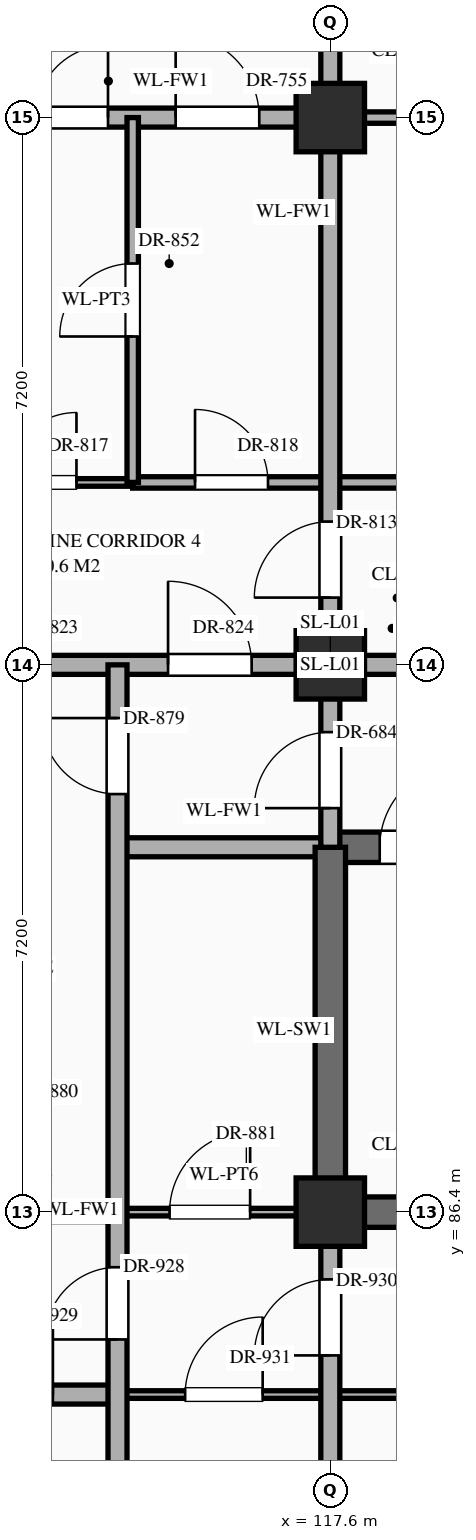
"""IFC4 building model, lengths in metres.
Left out: names, types, materials, properties, quantities, classifications, styles, units other than length and angle.
Written with IfcOpenShell. Run it as: python <this file> out.ifc"""

import sys

from ifc_helpers import new_model, si_unit, direction, frame, frame_2d, origin, origin_2d, place, context, subcontext, project, spatial, rectangle, extrude, element, fill, save


model = new_model("IFC4")
c1 = context("Model", 3, precision=1e-05, world=origin(), true_north=direction((0.0, 1.0)))
c2 = subcontext(c1, "Body", "Model", "MODEL_VIEW")
j1 = project(units=[si_unit("LENGTHUNIT", "METRE"), si_unit("PLANEANGLEUNIT", "RADIAN")], contexts=[c1])
p1 = place(None, origin())
s1 = spatial("IfcSite", under=j1, at=p1, CompositionType="ELEMENT")
p2 = place(p1, origin())
s2 = spatial("IfcBuilding", under=s1, at=p2, CompositionType="ELEMENT")
p3 = place(p2, origin())
s3 = spatial("IfcBuildingStorey", under=s2, at=p3, CompositionType="ELEMENT", Elevation=0.0)
for number, where, z_axis, x_axis in (
    (1, (117.6, 86.4, 0.0), (0.0, 0.0, 1.0), (1.0, 0.0, 0.0)),
    (2, (117.6, 93.6, 0.0), (0.0, 0.0, 1.0), (1.0, 0.0, 0.0)),
    (3, (117.6, 100.8, 0.0), (0.0, 0.0, 1.0), (1.0, 0.0, 0.0)),
):
    element("IfcColumn", number, at=place(p3, frame(where, z_axis=z_axis, x_axis=x_axis)), inside=s3, PredefinedType="COLUMN", context=c2, shape_type="SweptSolid", body=[
        extrude(rectangle(XDim=0.9, YDim=0.9, at=origin_2d()), origin(), (0.0, 0.0, 1.0), 5.4),
    ])
p4 = place(p3, frame((112.0, 84.0, 0.0), z_axis=(0.0, 0.0, 1.0), x_axis=(1.0, 0.0, 0.0)))
e4 = element("IfcWall", 4, at=p4, inside=s3, PredefinedType="STANDARD", context=c2, shape_type="SweptSolid", body=[
    extrude(rectangle(XDim=2.8, YDim=0.25, at=frame_2d((1.4, 0.0))), origin(), (0.0, 0.0, 1.0), 5.12),
])
p5 = place(p4, frame((0.85, 0.0, 0.0)))
e5 = element("IfcOpeningElement", 5, at=p5, cuts=e4, PredefinedType="OPENING", context=c2, shape_type="SweptSolid", body=[
    extrude(rectangle(XDim=1.1, YDim=2.2, at=frame_2d((0.55, 1.1))), frame((0.0, 0.137, 0.0), z_axis=(0.0, -1.0, 0.0), x_axis=(1.0, 0.0, 0.0)), (0.0, 0.0, 1.0), 0.274),
])
p6 = place(p3, frame((114.8, 84.0, 0.0), z_axis=(0.0, 0.0, 1.0), x_axis=(1.0, 0.0, 0.0)))
e6 = element("IfcWall", 6, at=p6, inside=s3, PredefinedType="STANDARD", context=c2, shape_type="SweptSolid", body=[
    extrude(rectangle(XDim=22.4, YDim=0.1, at=frame_2d((11.2, 0.0))), origin(), (0.0, 0.0, 1.0), 5.12),
])
p7 = place(p6, frame((0.89, 0.0, 0.0)))
e7 = element("IfcOpeningElement", 7, at=p7, cuts=e6, PredefinedType="OPENING", context=c2, shape_type="SweptSolid", body=[
    extrude(rectangle(XDim=1.02, YDim=2.4, at=frame_2d((0.51, 1.2))), frame((0.0, 0.062, 0.0), z_axis=(0.0, -1.0, 0.0), x_axis=(1.0, 0.0, 0.0)), (0.0, 0.0, 1.0), 0.124),
])
p8 = place(p6, frame((10.63, 0.0, 0.0)))
e8 = element("IfcOpeningElement", 8, at=p8, cuts=e6, PredefinedType="OPENING", context=c2, shape_type="SweptSolid", body=[
    extrude(rectangle(XDim=1.14, YDim=2.4, at=frame_2d((0.57, 1.2))), frame((0.0, 0.062, 0.0), z_axis=(0.0, -1.0, 0.0), x_axis=(1.0, 0.0, 0.0)), (0.0, 0.0, 1.0), 0.124),
])
p9 = place(p6, frame((20.55, 0.0, 0.0)))
e9 = element("IfcOpeningElement", 9, at=p9, cuts=e6, PredefinedType="OPENING", context=c2, shape_type="SweptSolid", body=[
    extrude(rectangle(XDim=0.9, YDim=2.15, at=frame_2d((0.45, 1.075))), frame((0.0, 0.062, 0.0), z_axis=(0.0, -1.0, 0.0), x_axis=(1.0, 0.0, 0.0)), (0.0, 0.0, 1.0), 0.124),
])
p10 = place(p3, frame((112.0, 86.4, 0.0), z_axis=(0.0, 0.0, 1.0), x_axis=(1.0, 0.0, 0.0)))
e10 = element("IfcWall", 10, at=p10, inside=s3, PredefinedType="STANDARD", context=c2, shape_type="SweptSolid", body=[
    extrude(rectangle(XDim=2.8, YDim=0.25, at=frame_2d((1.4, 0.0))), origin(), (0.0, 0.0, 1.0), 4.27),
])
p11 = place(p10, frame((0.925, 0.0, 0.0)))
e11 = element("IfcOpeningElement", 11, at=p11, cuts=e10, PredefinedType="OPENING", context=c2, shape_type="SweptSolid", body=[
    extrude(rectangle(XDim=0.95, YDim=2.15, at=frame_2d((0.475, 1.075))), frame((0.0, 0.137, 0.0), z_axis=(0.0, -1.0, 0.0), x_axis=(1.0, 0.0, 0.0)), (0.0, 0.0, 1.0), 0.274),
])
p12 = place(p3, frame((114.8, 86.4, 0.0), z_axis=(0.0, 0.0, 1.0), x_axis=(1.0, 0.0, 0.0)))
e12 = element("IfcWall", 12, at=p12, inside=s3, PredefinedType="STANDARD", context=c2, shape_type="SweptSolid", body=[
    extrude(rectangle(XDim=2.8, YDim=0.1, at=frame_2d((1.4, 0.0))), origin(), (0.0, 0.0, 1.0), 4.27),
])
p13 = place(p12, frame((0.685, 0.0, 0.0)))
e13 = element("IfcOpeningElement", 13, at=p13, cuts=e12, PredefinedType="OPENING", context=c2, shape_type="SweptSolid", body=[
    extrude(rectangle(XDim=1.06, YDim=2.4, at=frame_2d((0.53, 1.2))), frame((0.0, 0.062, 0.0), z_axis=(0.0, -1.0, 0.0), x_axis=(1.0, 0.0, 0.0)), (0.0, 0.0, 1.0), 0.124),
])
p14 = place(p3, frame((117.6, 86.4, 0.0), z_axis=(0.0, 0.0, 1.0), x_axis=(1.0, 0.0, 0.0)))
e14 = element("IfcWall", 14, at=p14, inside=s3, PredefinedType="SHEAR", context=c2, shape_type="SweptSolid", body=[
    extrude(rectangle(XDim=8.4, YDim=0.4, at=frame_2d((4.2, 0.0))), origin(), (0.0, 0.0, 1.0), 5.12),
])
p15 = place(p3, frame((114.8, 91.2, 0.0), z_axis=(0.0, 0.0, 1.0), x_axis=(1.0, 0.0, 0.0)))
e15 = element("IfcWall", 15, at=p15, inside=s3, PredefinedType="STANDARD", context=c2, shape_type="SweptSolid", body=[
    extrude(rectangle(XDim=2.8, YDim=0.25, at=frame_2d((1.4, 0.0))), origin(), (0.0, 0.0, 1.0), 5.12),
])
p16 = place(p3, frame((117.6, 91.2, 0.0), z_axis=(0.0, 0.0, 1.0), x_axis=(1.0, 0.0, 0.0)))
e16 = element("IfcWall", 16, at=p16, inside=s3, PredefinedType="SHEAR", context=c2, shape_type="SweptSolid", body=[
    extrude(rectangle(XDim=8.4, YDim=0.4, at=frame_2d((4.2, 0.0))), origin(), (0.0, 0.0, 1.0), 5.12),
])
p17 = place(p16, frame((0.65, 0.0, 0.0)))
e17 = element("IfcOpeningElement", 17, at=p17, cuts=e16, PredefinedType="OPENING", context=c2, shape_type="SweptSolid", body=[
    extrude(rectangle(XDim=1.1, YDim=2.2, at=frame_2d((0.55, 1.1))), frame((0.0, 0.212, 0.0), z_axis=(0.0, -1.0, 0.0), x_axis=(1.0, 0.0, 0.0)), (0.0, 0.0, 1.0), 0.424),
])
p18 = place(p3, frame((100.8, 93.6, 0.0), z_axis=(0.0, 0.0, 1.0), x_axis=(1.0, 0.0, 0.0)))
e18 = element("IfcWall", 18, at=p18, inside=s3, PredefinedType="STANDARD", context=c2, shape_type="SweptSolid", body=[
    extrude(rectangle(XDim=25.2, YDim=0.25, at=frame_2d((12.6, 0.0))), origin(), (0.0, 0.0, 1.0), 4.27),
])
p19 = place(p18, frame((3.2, 0.0, 0.0)))
e19 = element("IfcOpeningElement", 19, at=p19, cuts=e18, PredefinedType="OPENING", context=c2, shape_type="SweptSolid", body=[
    extrude(rectangle(XDim=2.0, YDim=2.4, at=frame_2d((1.0, 1.2))), frame((0.0, 0.137, 0.0), z_axis=(0.0, -1.0, 0.0), x_axis=(1.0, 0.0, 0.0)), (0.0, 0.0, 1.0), 0.274),
])
p20 = place(p18, frame((20.212, 0.0, 0.0)))
e20 = element("IfcOpeningElement", 20, at=p20, cuts=e18, PredefinedType="OPENING", context=c2, shape_type="SweptSolid", body=[
    extrude(rectangle(XDim=1.6, YDim=2.3, at=frame_2d((0.8, 1.15))), frame((0.0, 0.137, 0.0), z_axis=(0.0, -1.0, 0.0), x_axis=(1.0, 0.0, 0.0)), (0.0, 0.0, 1.0), 0.274),
])
p21 = place(p18, frame((9.485, 0.0, 0.0)))
e21 = element("IfcOpeningElement", 21, at=p21, cuts=e18, PredefinedType="OPENING", context=c2, shape_type="SweptSolid", body=[
    extrude(rectangle(XDim=1.0, YDim=2.2, at=frame_2d((0.5, 1.1))), frame((0.0, 0.137, 0.0), z_axis=(0.0, -1.0, 0.0), x_axis=(1.0, 0.0, 0.0)), (0.0, 0.0, 1.0), 0.274),
])
p22 = place(p18, frame((12.125, 0.0, 0.0)))
e22 = element("IfcOpeningElement", 22, at=p22, cuts=e18, PredefinedType="OPENING", context=c2, shape_type="SweptSolid", body=[
    extrude(rectangle(XDim=0.95, YDim=2.15, at=frame_2d((0.475, 1.075))), frame((0.0, 0.137, 0.0), z_axis=(0.0, -1.0, 0.0), x_axis=(1.0, 0.0, 0.0)), (0.0, 0.0, 1.0), 0.274),
])
p23 = place(p18, frame((14.665, 0.0, 0.0)))
e23 = element("IfcOpeningElement", 23, at=p23, cuts=e18, PredefinedType="OPENING", context=c2, shape_type="SweptSolid", body=[
    extrude(rectangle(XDim=1.1, YDim=2.2, at=frame_2d((0.55, 1.1))), frame((0.0, 0.137, 0.0), z_axis=(0.0, -1.0, 0.0), x_axis=(1.0, 0.0, 0.0)), (0.0, 0.0, 1.0), 0.274),
])
p24 = place(p3, frame((109.2, 96.0, 0.0), z_axis=(0.0, 0.0, 1.0), x_axis=(1.0, 0.0, 0.0)))
e24 = element("IfcWall", 24, at=p24, inside=s3, PredefinedType="STANDARD", context=c2, shape_type="SweptSolid", body=[
    extrude(rectangle(XDim=5.8, YDim=0.1, at=frame_2d((2.9, 0.0))), origin(), (0.0, 0.0, 1.0), 5.12),
])
p25 = place(p24, frame((1.27, 0.0, 0.0)))
e25 = element("IfcOpeningElement", 25, at=p25, cuts=e24, PredefinedType="OPENING", context=c2, shape_type="SweptSolid", body=[
    extrude(rectangle(XDim=0.86, YDim=2.1, at=frame_2d((0.43, 1.05))), frame((0.0, 0.062, 0.0), z_axis=(0.0, -1.0, 0.0), x_axis=(1.0, 0.0, 0.0)), (0.0, 0.0, 1.0), 0.124),
])
p26 = place(p24, frame((4.14, 0.0, 0.0)))
e26 = element("IfcOpeningElement", 26, at=p26, cuts=e24, PredefinedType="OPENING", context=c2, shape_type="SweptSolid", body=[
    extrude(rectangle(XDim=0.92, YDim=2.15, at=frame_2d((0.46, 1.075))), frame((0.0, 0.062, 0.0), z_axis=(0.0, -1.0, 0.0), x_axis=(1.0, 0.0, 0.0)), (0.0, 0.0, 1.0), 0.124),
])
p27 = place(p3, frame((115.0, 96.0, 0.0), z_axis=(0.0, 0.0, 1.0), x_axis=(1.0, 0.0, 0.0)))
e27 = element("IfcWall", 27, at=p27, inside=s3, PredefinedType="STANDARD", context=c2, shape_type="SweptSolid", body=[
    extrude(rectangle(XDim=19.4, YDim=0.15, at=frame_2d((9.7, 0.0))), origin(), (0.0, 0.0, 1.0), 5.12),
])
p28 = place(p27, frame((0.82, 0.0, 0.0)))
e28 = element("IfcOpeningElement", 28, at=p28, cuts=e27, PredefinedType="OPENING", context=c2, shape_type="SweptSolid", body=[
    extrude(rectangle(XDim=0.96, YDim=2.2, at=frame_2d((0.48, 1.1))), frame((0.0, 0.087, 0.0), z_axis=(0.0, -1.0, 0.0), x_axis=(1.0, 0.0, 0.0)), (0.0, 0.0, 1.0), 0.174),
])
p29 = place(p27, frame((6.18, 0.0, 0.0)))
e29 = element("IfcOpeningElement", 29, at=p29, cuts=e27, PredefinedType="OPENING", context=c2, shape_type="SweptSolid", body=[
    extrude(rectangle(XDim=1.24, YDim=2.3, at=frame_2d((0.62, 1.15))), frame((0.0, 0.087, 0.0), z_axis=(0.0, -1.0, 0.0), x_axis=(1.0, 0.0, 0.0)), (0.0, 0.0, 1.0), 0.174),
])
p30 = place(p27, frame((14.56, 0.0, 0.0)))
e30 = element("IfcOpeningElement", 30, at=p30, cuts=e27, PredefinedType="OPENING", context=c2, shape_type="SweptSolid", body=[
    extrude(rectangle(XDim=1.28, YDim=2.35, at=frame_2d((0.64, 1.175))), frame((0.0, 0.087, 0.0), z_axis=(0.0, -1.0, 0.0), x_axis=(1.0, 0.0, 0.0)), (0.0, 0.0, 1.0), 0.174),
])
p31 = place(p3, frame((113.4, 100.8, 0.0), z_axis=(0.0, 0.0, 1.0), x_axis=(1.0, 0.0, 0.0)))
e31 = element("IfcWall", 31, at=p31, inside=s3, PredefinedType="STANDARD", context=c2, shape_type="SweptSolid", body=[
    extrude(rectangle(XDim=4.2, YDim=0.25, at=frame_2d((2.1, 0.0))), origin(), (0.0, 0.0, 1.0), 4.27),
])
p32 = place(p31, frame((0.325, 0.0, 0.0)))
e32 = element("IfcOpeningElement", 32, at=p32, cuts=e31, PredefinedType="OPENING", context=c2, shape_type="SweptSolid", body=[
    extrude(rectangle(XDim=0.95, YDim=2.15, at=frame_2d((0.475, 1.075))), frame((0.0, 0.137, 0.0), z_axis=(0.0, -1.0, 0.0), x_axis=(1.0, 0.0, 0.0)), (0.0, 0.0, 1.0), 0.274),
])
p33 = place(p31, frame((2.165, 0.0, 0.0)))
e33 = element("IfcOpeningElement", 33, at=p33, cuts=e31, PredefinedType="OPENING", context=c2, shape_type="SweptSolid", body=[
    extrude(rectangle(XDim=1.1, YDim=2.2, at=frame_2d((0.55, 1.1))), frame((0.0, 0.137, 0.0), z_axis=(0.0, -1.0, 0.0), x_axis=(1.0, 0.0, 0.0)), (0.0, 0.0, 1.0), 0.274),
])
p34 = place(p3, frame((117.6, 100.8, 0.0), z_axis=(0.0, 0.0, 1.0), x_axis=(1.0, 0.0, 0.0)))
e34 = element("IfcWall", 34, at=p34, inside=s3, PredefinedType="STANDARD", context=c2, shape_type="SweptSolid", body=[
    extrude(rectangle(XDim=4.2, YDim=0.15, at=frame_2d((2.1, 0.0))), origin(), (0.0, 0.0, 1.0), 4.27),
])
p35 = place(p34, frame((1.855, 0.0, 0.0)))
e35 = element("IfcOpeningElement", 35, at=p35, cuts=e34, PredefinedType="OPENING", context=c2, shape_type="SweptSolid", body=[
    extrude(rectangle(XDim=0.86, YDim=2.1, at=frame_2d((0.43, 1.05))), frame((0.0, 0.087, 0.0), z_axis=(0.0, -1.0, 0.0), x_axis=(1.0, 0.0, 0.0)), (0.0, 0.0, 1.0), 0.174),
])
p36 = place(p3, frame((114.8, 79.24, 0.0), z_axis=(0.0, 0.0, 1.0), x_axis=(0.0, 1.0, 0.0)))
e36 = element("IfcWall", 36, at=p36, inside=s3, PredefinedType="STANDARD", context=c2, shape_type="SweptSolid", body=[
    extrude(rectangle(XDim=14.36, YDim=0.25, at=frame_2d((7.18, 0.0))), origin(), (0.0, 0.0, 1.0), 5.12),
])
p37 = place(p36, frame((12.66, 0.0, 0.0)))
e37 = element("IfcOpeningElement", 37, at=p37, cuts=e36, PredefinedType="OPENING", context=c2, shape_type="SweptSolid", body=[
    extrude(rectangle(XDim=1.0, YDim=2.2, at=frame_2d((0.5, 1.1))), frame((0.0, 0.137, 0.0), z_axis=(0.0, -1.0, 0.0), x_axis=(1.0, 0.0, 0.0)), (0.0, 0.0, 1.0), 0.274),
])
p38 = place(p36, frame((5.485, 0.0, 0.0)))
e38 = element("IfcOpeningElement", 38, at=p38, cuts=e36, PredefinedType="OPENING", context=c2, shape_type="SweptSolid", body=[
    extrude(rectangle(XDim=0.95, YDim=2.15, at=frame_2d((0.475, 1.075))), frame((0.0, 0.137, 0.0), z_axis=(0.0, -1.0, 0.0), x_axis=(1.0, 0.0, 0.0)), (0.0, 0.0, 1.0), 0.274),
])
p39 = place(p3, frame((115.0, 96.0, 0.0), z_axis=(0.0, 0.0, 1.0), x_axis=(0.0, 1.0, 0.0)))
e39 = element("IfcWall", 39, at=p39, inside=s3, PredefinedType="STANDARD", context=c2, shape_type="SweptSolid", body=[
    extrude(rectangle(XDim=4.8, YDim=0.15, at=frame_2d((2.4, 0.0))), origin(), (0.0, 0.0, 1.0), 5.12),
])
p40 = place(p39, frame((1.92, 0.0, 0.0)))
e40 = element("IfcOpeningElement", 40, at=p40, cuts=e39, PredefinedType="OPENING", context=c2, shape_type="SweptSolid", body=[
    extrude(rectangle(XDim=0.96, YDim=2.2, at=frame_2d((0.48, 1.1))), frame((0.0, 0.087, 0.0), z_axis=(0.0, -1.0, 0.0), x_axis=(1.0, 0.0, 0.0)), (0.0, 0.0, 1.0), 0.174),
])
p41 = place(p3, frame((117.6, 79.24, 0.0), z_axis=(0.0, 0.0, 1.0), x_axis=(0.0, 1.0, 0.0)))
e41 = element("IfcWall", 41, at=p41, inside=s3, PredefinedType="STANDARD", context=c2, shape_type="SweptSolid", body=[
    extrude(rectangle(XDim=7.16, YDim=0.25, at=frame_2d((3.58, 0.0))), origin(), (0.0, 0.0, 1.0), 4.37),
])
p42 = place(p41, frame((5.275, 0.0, 0.0)))
e42 = element("IfcOpeningElement", 42, at=p42, cuts=e41, PredefinedType="OPENING", context=c2, shape_type="SweptSolid", body=[
    extrude(rectangle(XDim=1.0, YDim=2.2, at=frame_2d((0.5, 1.1))), frame((0.0, 0.137, 0.0), z_axis=(0.0, -1.0, 0.0), x_axis=(1.0, 0.0, 0.0)), (0.0, 0.0, 1.0), 0.274),
])
p43 = place(p3, frame((117.6, 86.4, 0.0), z_axis=(0.0, 0.0, 1.0), x_axis=(0.0, 1.0, 0.0)))
e43 = element("IfcWall", 43, at=p43, inside=s3, PredefinedType="SHEAR", context=c2, shape_type="SweptSolid", body=[
    extrude(rectangle(XDim=4.8, YDim=0.4, at=frame_2d((2.4, 0.0))), origin(), (0.0, 0.0, 1.0), 5.12),
])
p44 = place(p3, frame((117.6, 91.2, 0.0), z_axis=(0.0, 0.0, 1.0), x_axis=(0.0, 1.0, 0.0)))
e44 = element("IfcWall", 44, at=p44, inside=s3, PredefinedType="STANDARD", context=c2, shape_type="SweptSolid", body=[
    extrude(rectangle(XDim=13.2, YDim=0.25, at=frame_2d((6.6, 0.0))), origin(), (0.0, 0.0, 1.0), 4.37),
])
p45 = place(p44, frame((0.515, 0.0, 0.0)))
e45 = element("IfcOpeningElement", 45, at=p45, cuts=e44, PredefinedType="OPENING", context=c2, shape_type="SweptSolid", body=[
    extrude(rectangle(XDim=1.0, YDim=2.2, at=frame_2d((0.5, 1.1))), frame((0.0, 0.137, 0.0), z_axis=(0.0, -1.0, 0.0), x_axis=(1.0, 0.0, 0.0)), (0.0, 0.0, 1.0), 0.274),
])
p46 = place(p44, frame((10.51, 0.0, 0.0)))
e46 = element("IfcOpeningElement", 46, at=p46, cuts=e44, PredefinedType="OPENING", context=c2, shape_type="SweptSolid", body=[
    extrude(rectangle(XDim=0.95, YDim=2.15, at=frame_2d((0.475, 1.075))), frame((0.0, 0.137, 0.0), z_axis=(0.0, -1.0, 0.0), x_axis=(1.0, 0.0, 0.0)), (0.0, 0.0, 1.0), 0.274),
])
p47 = place(p44, frame((3.285, 0.0, 0.0)))
e47 = element("IfcOpeningElement", 47, at=p47, cuts=e44, PredefinedType="OPENING", context=c2, shape_type="SweptSolid", body=[
    extrude(rectangle(XDim=1.0, YDim=2.2, at=frame_2d((0.5, 1.1))), frame((0.0, 0.137, 0.0), z_axis=(0.0, -1.0, 0.0), x_axis=(1.0, 0.0, 0.0)), (0.0, 0.0, 1.0), 0.274),
])
p48 = place(p17, origin())
e48 = element("IfcDoor", 48, at=p48, inside=s3, OperationType="SINGLE_SWING_RIGHT", PredefinedType="DOOR", context=c2, shape_type="SweptSolid", body=[
    extrude(rectangle(XDim=1.1, YDim=2.2, at=frame_2d((0.55, 1.1))), frame((0.0, 0.025, 0.0), z_axis=(0.0, -1.0, 0.0), x_axis=(1.0, 0.0, 0.0)), (0.0, 0.0, 1.0), 0.05),
])
fill(e17, e48)
p49 = place(p45, origin())
e49 = element("IfcDoor", 49, at=p49, inside=s3, OperationType="SINGLE_SWING_LEFT", PredefinedType="DOOR", context=c2, shape_type="SweptSolid", body=[
    extrude(rectangle(XDim=1.0, YDim=2.2, at=frame_2d((0.5, 1.1))), frame((0.0, 0.025, 0.0), z_axis=(0.0, -1.0, 0.0), x_axis=(1.0, 0.0, 0.0)), (0.0, 0.0, 1.0), 0.05),
])
fill(e45, e49)
p50 = place(p32, origin())
e50 = element("IfcDoor", 50, at=p50, inside=s3, OperationType="SINGLE_SWING_RIGHT", PredefinedType="DOOR", context=c2, shape_type="SweptSolid", body=[
    extrude(rectangle(XDim=0.95, YDim=2.15, at=frame_2d((0.475, 1.075))), frame((0.0, 0.025, 0.0), z_axis=(0.0, -1.0, 0.0), x_axis=(1.0, 0.0, 0.0)), (0.0, 0.0, 1.0), 0.05),
])
fill(e32, e50)
p51 = place(p33, origin())
e51 = element("IfcDoor", 51, at=p51, inside=s3, OperationType="SINGLE_SWING_LEFT", PredefinedType="DOOR", context=c2, shape_type="SweptSolid", body=[
    extrude(rectangle(XDim=1.1, YDim=2.2, at=frame_2d((0.55, 1.1))), frame((0.0, 0.025, 0.0), z_axis=(0.0, -1.0, 0.0), x_axis=(1.0, 0.0, 0.0)), (0.0, 0.0, 1.0), 0.05),
])
fill(e33, e51)
p52 = place(p47, origin())
e52 = element("IfcDoor", 52, at=p52, inside=s3, OperationType="SINGLE_SWING_LEFT", PredefinedType="DOOR", context=c2, shape_type="SweptSolid", body=[
    extrude(rectangle(XDim=1.0, YDim=2.2, at=frame_2d((0.5, 1.1))), frame((0.0, 0.025, 0.0), z_axis=(0.0, -1.0, 0.0), x_axis=(1.0, 0.0, 0.0)), (0.0, 0.0, 1.0), 0.05),
])
fill(e47, e52)
p53 = place(p26, origin())
e53 = element("IfcDoor", 53, at=p53, inside=s3, OperationType="SINGLE_SWING_RIGHT", PredefinedType="DOOR", context=c2, shape_type="SweptSolid", body=[
    extrude(rectangle(XDim=0.92, YDim=2.15, at=frame_2d((0.46, 1.075))), frame((0.0, 0.025, 0.0), z_axis=(0.0, -1.0, 0.0), x_axis=(1.0, 0.0, 0.0)), (0.0, 0.0, 1.0), 0.05),
])
fill(e26, e53)
p54 = place(p28, origin())
e54 = element("IfcDoor", 54, at=p54, inside=s3, OperationType="SINGLE_SWING_LEFT", PredefinedType="DOOR", context=c2, shape_type="SweptSolid", body=[
    extrude(rectangle(XDim=0.96, YDim=2.2, at=frame_2d((0.48, 1.1))), frame((0.0, 0.025, 0.0), z_axis=(0.0, -1.0, 0.0), x_axis=(1.0, 0.0, 0.0)), (0.0, 0.0, 1.0), 0.05),
])
fill(e28, e54)
p55 = place(p23, origin())
e55 = element("IfcDoor", 55, at=p55, inside=s3, OperationType="SINGLE_SWING_LEFT", PredefinedType="DOOR", context=c2, shape_type="SweptSolid", body=[
    extrude(rectangle(XDim=1.1, YDim=2.2, at=frame_2d((0.55, 1.1))), frame((0.0, 0.025, 0.0), z_axis=(0.0, -1.0, 0.0), x_axis=(1.0, 0.0, 0.0)), (0.0, 0.0, 1.0), 0.05),
])
fill(e23, e55)
p56 = place(p40, origin())
e56 = element("IfcDoor", 56, at=p56, inside=s3, OperationType="SINGLE_SWING_LEFT", PredefinedType="DOOR", context=c2, shape_type="SweptSolid", body=[
    extrude(rectangle(XDim=0.96, YDim=2.2, at=frame_2d((0.48, 1.1))), frame((0.0, 0.025, 0.0), z_axis=(0.0, -1.0, 0.0), x_axis=(1.0, 0.0, 0.0)), (0.0, 0.0, 1.0), 0.05),
])
fill(e40, e56)
p57 = place(p37, origin())
e57 = element("IfcDoor", 57, at=p57, inside=s3, OperationType="SINGLE_SWING_RIGHT", PredefinedType="DOOR", context=c2, shape_type="SweptSolid", body=[
    extrude(rectangle(XDim=1.0, YDim=2.2, at=frame_2d((0.5, 1.1))), frame((0.0, 0.025, 0.0), z_axis=(0.0, -1.0, 0.0), x_axis=(1.0, 0.0, 0.0)), (0.0, 0.0, 1.0), 0.05),
])
fill(e37, e57)
p58 = place(p13, origin())
e58 = element("IfcDoor", 58, at=p58, inside=s3, OperationType="SINGLE_SWING_RIGHT", PredefinedType="DOOR", context=c2, shape_type="SweptSolid", body=[
    extrude(rectangle(XDim=1.06, YDim=2.4, at=frame_2d((0.53, 1.2))), frame((0.0, 0.025, 0.0), z_axis=(0.0, -1.0, 0.0), x_axis=(1.0, 0.0, 0.0)), (0.0, 0.0, 1.0), 0.05),
])
fill(e13, e58)
p59 = place(p38, origin())
e59 = element("IfcDoor", 59, at=p59, inside=s3, OperationType="SINGLE_SWING_LEFT", PredefinedType="DOOR", context=c2, shape_type="SweptSolid", body=[
    extrude(rectangle(XDim=0.95, YDim=2.15, at=frame_2d((0.475, 1.075))), frame((0.0, 0.025, 0.0), z_axis=(0.0, -1.0, 0.0), x_axis=(1.0, 0.0, 0.0)), (0.0, 0.0, 1.0), 0.05),
])
fill(e38, e59)
p60 = place(p5, origin())
e60 = element("IfcDoor", 60, at=p60, inside=s3, OperationType="SINGLE_SWING_RIGHT", PredefinedType="DOOR", context=c2, shape_type="SweptSolid", body=[
    extrude(rectangle(XDim=1.1, YDim=2.2, at=frame_2d((0.55, 1.1))), frame((0.0, 0.025, 0.0), z_axis=(0.0, -1.0, 0.0), x_axis=(1.0, 0.0, 0.0)), (0.0, 0.0, 1.0), 0.05),
])
fill(e5, e60)
p61 = place(p42, origin())
e61 = element("IfcDoor", 61, at=p61, inside=s3, OperationType="SINGLE_SWING_LEFT", PredefinedType="DOOR", context=c2, shape_type="SweptSolid", body=[
    extrude(rectangle(XDim=1.0, YDim=2.2, at=frame_2d((0.5, 1.1))), frame((0.0, 0.025, 0.0), z_axis=(0.0, -1.0, 0.0), x_axis=(1.0, 0.0, 0.0)), (0.0, 0.0, 1.0), 0.05),
])
fill(e42, e61)
p62 = place(p7, origin())
e62 = element("IfcDoor", 62, at=p62, inside=s3, OperationType="SINGLE_SWING_RIGHT", PredefinedType="DOOR", context=c2, shape_type="SweptSolid", body=[
    extrude(rectangle(XDim=1.02, YDim=2.4, at=frame_2d((0.51, 1.2))), frame((0.0, 0.025, 0.0), z_axis=(0.0, -1.0, 0.0), x_axis=(1.0, 0.0, 0.0)), (0.0, 0.0, 1.0), 0.05),
])
fill(e7, e62)
save(model, sys.argv[1])
